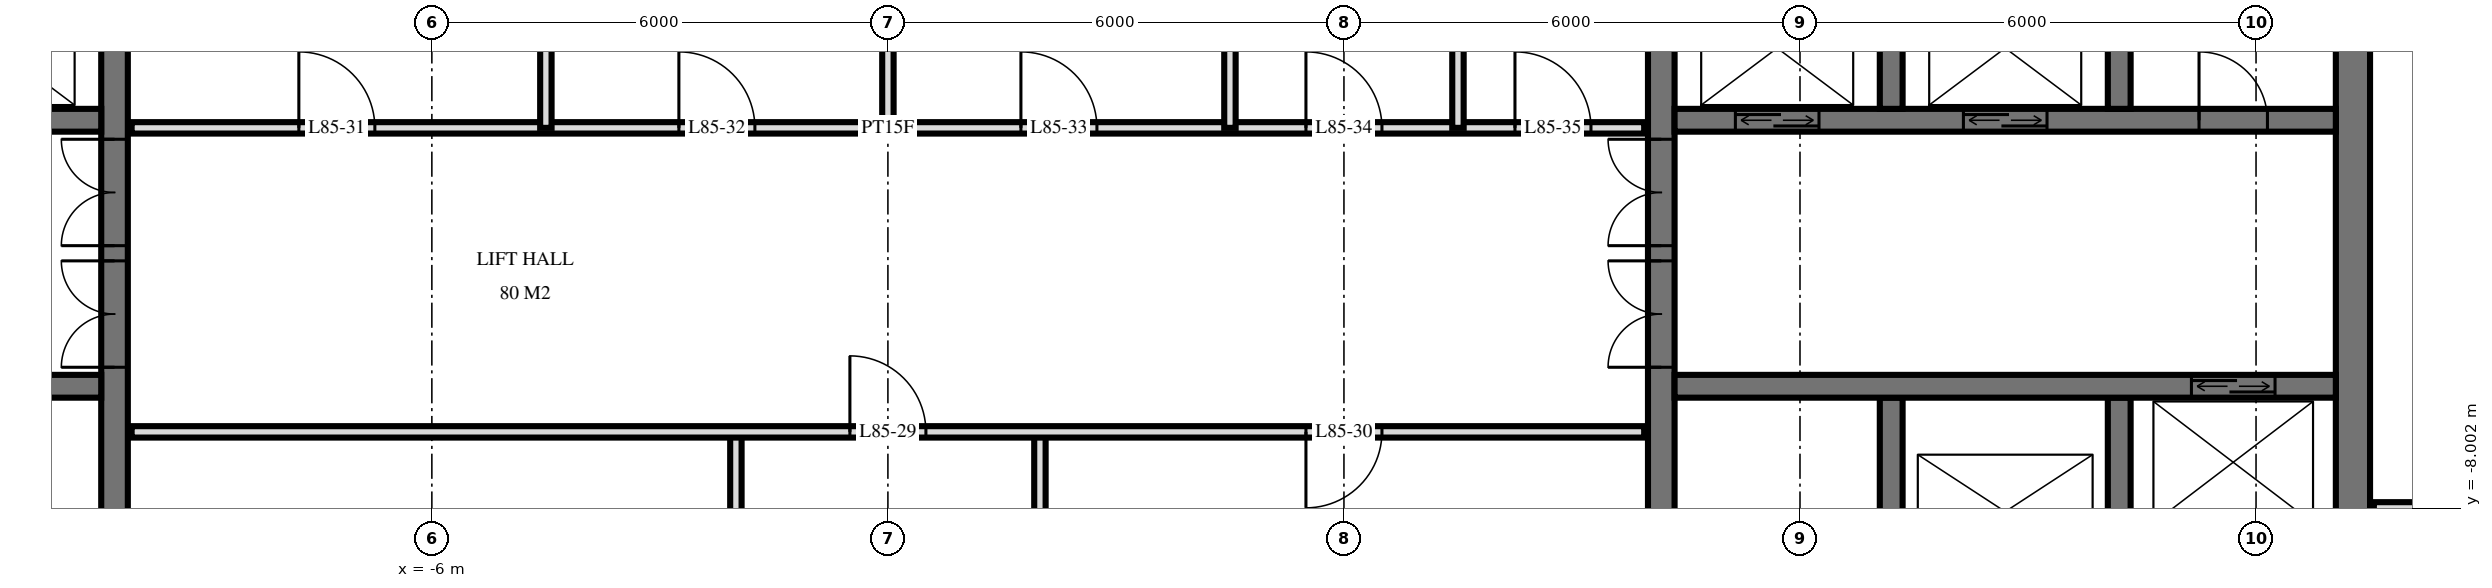
"""IFC4 building model, lengths in metres.
Left out: names, types, materials, properties, quantities, classifications, styles, units other than length and angle.
Written with IfcOpenShell. Run it as: python <this file> out.ifc"""

import sys

from ifc_helpers import new_model, si_unit, direction, frame, frame_2d, origin, place, context, subcontext, project, spatial, rectangle, extrude, element, fill, save


model = new_model("IFC4")
c1 = context("Model", 3, precision=1e-05, world=origin(), true_north=direction((0.0, 1.0)))
c2 = subcontext(c1, "Body", "Model", "MODEL_VIEW")
j1 = project(units=[si_unit("LENGTHUNIT", "METRE"), si_unit("PLANEANGLEUNIT", "RADIAN")], contexts=[c1])
p1 = place(None, origin())
s1 = spatial("IfcSite", under=j1, at=p1, CompositionType="ELEMENT")
p2 = place(p1, origin())
s2 = spatial("IfcBuilding", under=s1, at=p2, CompositionType="ELEMENT")
p3 = place(p2, frame((0.0, 0.0, 322.6)))
s3 = spatial("IfcBuildingStorey", under=s2, at=p3, CompositionType="ELEMENT", Elevation=322.6)
p4 = place(p3, frame((-10.175, -14.55, 0.0), z_axis=(0.0, 0.0, 1.0), x_axis=(0.0, 1.0, 0.0)))
e1 = element("IfcWall", 1, at=p4, inside=s3, PredefinedType="SHEAR", context=c2, shape_type="SweptSolid", body=[
    extrude(rectangle(XDim=14.1, YDim=0.35, at=frame_2d((7.05, 0.0))), origin(), (0.0, 0.0, 1.0), 4.0),
])
p5 = place(p4, frame((8.4, 0.0, 0.0)))
e2 = element("IfcOpeningElement", 2, at=p5, cuts=e1, PredefinedType="OPENING", context=c2, shape_type="SweptSolid", body=[
    extrude(rectangle(XDim=1.4, YDim=2.4, at=frame_2d((0.7, 1.2))), frame((0.0, 0.185, 0.0), z_axis=(0.0, -1.0, 0.0), x_axis=(1.0, 0.0, 0.0)), (0.0, 0.0, 1.0), 0.37),
])
p6 = place(p4, frame((10.0, 0.0, 0.0)))
e3 = element("IfcOpeningElement", 3, at=p6, cuts=e1, PredefinedType="OPENING", context=c2, shape_type="SweptSolid", body=[
    extrude(rectangle(XDim=1.4, YDim=2.4, at=frame_2d((0.7, 1.2))), frame((0.0, 0.185, 0.0), z_axis=(0.0, -1.0, 0.0), x_axis=(1.0, 0.0, 0.0)), (0.0, 0.0, 1.0), 0.37),
])
p7 = place(p4, frame((4.0, 0.0, 0.0)))
e4 = element("IfcOpeningElement", 4, at=p7, cuts=e1, PredefinedType="OPENING", context=c2, shape_type="SweptSolid", body=[
    extrude(rectangle(XDim=1.2, YDim=2.1, at=frame_2d((0.6, 1.05))), frame((0.0, 0.185, 0.0), z_axis=(0.0, -1.0, 0.0), x_axis=(1.0, 0.0, 0.0)), (0.0, 0.0, 1.0), 0.37),
])
p8 = place(p3, frame((-19.05, -2.9, 0.0), z_axis=(0.0, 0.0, 1.0), x_axis=(1.0, 0.0, 0.0)))
e5 = element("IfcWall", 5, at=p8, inside=s3, PredefinedType="SHEAR", context=c2, shape_type="SweptSolid", body=[
    extrude(rectangle(XDim=8.7, YDim=0.3, at=frame_2d((4.35, 0.0))), origin(), (0.0, 0.0, 1.0), 4.0),
])
p9 = place(p8, frame((6.8, 0.0, 0.0)))
e6 = element("IfcOpeningElement", 6, at=p9, cuts=e5, PredefinedType="OPENING", context=c2, shape_type="SweptSolid", body=[
    extrude(rectangle(XDim=1.1, YDim=2.1, at=frame_2d((0.55, 1.05))), frame((0.0, 0.16, 0.0), z_axis=(0.0, -1.0, 0.0), x_axis=(1.0, 0.0, 0.0)), (0.0, 0.0, 1.0), 0.32),
])
p10 = place(p8, frame((3.8, 0.0, 0.0)))
e7 = element("IfcOpeningElement", 7, at=p10, cuts=e5, PredefinedType="OPENING", context=c2, shape_type="SweptSolid", body=[
    extrude(rectangle(XDim=1.1, YDim=2.1, at=frame_2d((0.55, 1.05))), frame((0.0, 0.16, 0.0), z_axis=(0.0, -1.0, 0.0), x_axis=(1.0, 0.0, 0.0)), (0.0, 0.0, 1.0), 0.32),
])
p11 = place(p8, frame((0.9, 0.0, 0.0)))
e8 = element("IfcOpeningElement", 8, at=p11, cuts=e5, PredefinedType="OPENING", context=c2, shape_type="SweptSolid", body=[
    extrude(rectangle(XDim=0.9, YDim=2.1, at=frame_2d((0.45, 1.05))), frame((0.0, 0.16, 0.0), z_axis=(0.0, -1.0, 0.0), x_axis=(1.0, 0.0, 0.0)), (0.0, 0.0, 1.0), 0.32),
])
p12 = place(p3, frame((-19.05, -6.4, 0.0), z_axis=(0.0, 0.0, 1.0), x_axis=(1.0, 0.0, 0.0)))
e9 = element("IfcWall", 9, at=p12, inside=s3, PredefinedType="SHEAR", context=c2, shape_type="SweptSolid", body=[
    extrude(rectangle(XDim=8.7, YDim=0.3, at=frame_2d((4.35, 0.0))), origin(), (0.0, 0.0, 1.0), 4.0),
])
p13 = place(p12, frame((0.8, 0.0, 0.0)))
e10 = element("IfcOpeningElement", 10, at=p13, cuts=e9, PredefinedType="OPENING", context=c2, shape_type="SweptSolid", body=[
    extrude(rectangle(XDim=1.1, YDim=2.1, at=frame_2d((0.55, 1.05))), frame((0.0, 0.16, 0.0), z_axis=(0.0, -1.0, 0.0), x_axis=(1.0, 0.0, 0.0)), (0.0, 0.0, 1.0), 0.32),
])
p14 = place(p3, frame((10.175, -14.55, 0.0), z_axis=(0.0, 0.0, 1.0), x_axis=(0.0, 1.0, 0.0)))
e11 = element("IfcWall", 11, at=p14, inside=s3, PredefinedType="SHEAR", context=c2, shape_type="SweptSolid", body=[
    extrude(rectangle(XDim=14.1, YDim=0.35, at=frame_2d((7.05, 0.0))), origin(), (0.0, 0.0, 1.0), 4.0),
])
p15 = place(p14, frame((8.4, 0.0, 0.0)))
e12 = element("IfcOpeningElement", 12, at=p15, cuts=e11, PredefinedType="OPENING", context=c2, shape_type="SweptSolid", body=[
    extrude(rectangle(XDim=1.4, YDim=2.4, at=frame_2d((0.7, 1.2))), frame((0.0, 0.185, 0.0), z_axis=(0.0, -1.0, 0.0), x_axis=(1.0, 0.0, 0.0)), (0.0, 0.0, 1.0), 0.37),
])
p16 = place(p14, frame((10.0, 0.0, 0.0)))
e13 = element("IfcOpeningElement", 13, at=p16, cuts=e11, PredefinedType="OPENING", context=c2, shape_type="SweptSolid", body=[
    extrude(rectangle(XDim=1.4, YDim=2.4, at=frame_2d((0.7, 1.2))), frame((0.0, 0.185, 0.0), z_axis=(0.0, -1.0, 0.0), x_axis=(1.0, 0.0, 0.0)), (0.0, 0.0, 1.0), 0.37),
])
p17 = place(p14, frame((4.0, 0.0, 0.0)))
e14 = element("IfcOpeningElement", 14, at=p17, cuts=e11, PredefinedType="OPENING", context=c2, shape_type="SweptSolid", body=[
    extrude(rectangle(XDim=1.2, YDim=2.1, at=frame_2d((0.6, 1.05))), frame((0.0, 0.185, 0.0), z_axis=(0.0, -1.0, 0.0), x_axis=(1.0, 0.0, 0.0)), (0.0, 0.0, 1.0), 0.37),
])
p18 = place(p3, frame((19.275, -14.55, 0.0), z_axis=(0.0, 0.0, 1.0), x_axis=(0.0, 1.0, 0.0)))
e15 = element("IfcWall", 15, at=p18, inside=s3, PredefinedType="SHEAR", context=c2, shape_type="SweptSolid", body=[
    extrude(rectangle(XDim=14.1, YDim=0.45, at=frame_2d((7.05, 0.0))), origin(), (0.0, 0.0, 1.0), 4.0),
])
p19 = place(p3, frame((10.35, -2.9, 0.0), z_axis=(0.0, 0.0, 1.0), x_axis=(1.0, 0.0, 0.0)))
e16 = element("IfcWall", 16, at=p19, inside=s3, PredefinedType="SHEAR", context=c2, shape_type="SweptSolid", body=[
    extrude(rectangle(XDim=8.7, YDim=0.3, at=frame_2d((4.35, 0.0))), origin(), (0.0, 0.0, 1.0), 4.0),
])
p20 = place(p19, frame((0.8, 0.0, 0.0)))
e17 = element("IfcOpeningElement", 17, at=p20, cuts=e16, PredefinedType="OPENING", context=c2, shape_type="SweptSolid", body=[
    extrude(rectangle(XDim=1.1, YDim=2.1, at=frame_2d((0.55, 1.05))), frame((0.0, 0.16, 0.0), z_axis=(0.0, -1.0, 0.0), x_axis=(1.0, 0.0, 0.0)), (0.0, 0.0, 1.0), 0.32),
])
p21 = place(p19, frame((3.8, 0.0, 0.0)))
e18 = element("IfcOpeningElement", 18, at=p21, cuts=e16, PredefinedType="OPENING", context=c2, shape_type="SweptSolid", body=[
    extrude(rectangle(XDim=1.1, YDim=2.1, at=frame_2d((0.55, 1.05))), frame((0.0, 0.16, 0.0), z_axis=(0.0, -1.0, 0.0), x_axis=(1.0, 0.0, 0.0)), (0.0, 0.0, 1.0), 0.32),
])
p22 = place(p19, frame((6.9, 0.0, 0.0)))
e19 = element("IfcOpeningElement", 19, at=p22, cuts=e16, PredefinedType="OPENING", context=c2, shape_type="SweptSolid", body=[
    extrude(rectangle(XDim=0.9, YDim=2.1, at=frame_2d((0.45, 1.05))), frame((0.0, 0.16, 0.0), z_axis=(0.0, -1.0, 0.0), x_axis=(1.0, 0.0, 0.0)), (0.0, 0.0, 1.0), 0.32),
])
p23 = place(p3, frame((10.35, -6.4, 0.0), z_axis=(0.0, 0.0, 1.0), x_axis=(1.0, 0.0, 0.0)))
e20 = element("IfcWall", 20, at=p23, inside=s3, PredefinedType="SHEAR", context=c2, shape_type="SweptSolid", body=[
    extrude(rectangle(XDim=8.7, YDim=0.3, at=frame_2d((4.35, 0.0))), origin(), (0.0, 0.0, 1.0), 4.0),
])
p24 = place(p23, frame((6.8, 0.0, 0.0)))
e21 = element("IfcOpeningElement", 21, at=p24, cuts=e20, PredefinedType="OPENING", context=c2, shape_type="SweptSolid", body=[
    extrude(rectangle(XDim=1.1, YDim=2.1, at=frame_2d((0.55, 1.05))), frame((0.0, 0.16, 0.0), z_axis=(0.0, -1.0, 0.0), x_axis=(1.0, 0.0, 0.0)), (0.0, 0.0, 1.0), 0.32),
])
for number, where, z_axis, x_axis in (
    (22, (13.2, -2.75, 0.0), (0.0, 0.0, 1.0), (0.0, 1.0, 0.0)),
    (23, (13.2, -8.85, 0.0), (0.0, 0.0, 1.0), (0.0, 1.0, 0.0)),
    (24, (16.2, -2.75, 0.0), (0.0, 0.0, 1.0), (0.0, 1.0, 0.0)),
    (25, (16.2, -8.85, 0.0), (0.0, 0.0, 1.0), (0.0, 1.0, 0.0)),
):
    element("IfcWall", number, at=place(p3, frame(where, z_axis=z_axis, x_axis=x_axis)), inside=s3, PredefinedType="SHEAR", context=c2, shape_type="SweptSolid", body=[
        extrude(rectangle(XDim=2.3, YDim=0.3, at=frame_2d((1.15, 0.0))), origin(), (0.0, 0.0, 1.0), 4.0),
    ])
p25 = place(p3, frame((7.5, -3.0, 0.0), z_axis=(0.0, 0.0, 1.0), x_axis=(0.0, 1.0, 0.0)))
e26 = element("IfcWall", 26, at=p25, inside=s3, PredefinedType="PLUMBINGWALL", context=c2, shape_type="SweptSolid", body=[
    extrude(rectangle(XDim=7.445, YDim=0.15, at=frame_2d((3.723, 0.0))), origin(), (0.0, 0.0, 1.0), 3.72),
])
p26 = place(p3, frame((4.5, -3.0, 0.0), z_axis=(0.0, 0.0, 1.0), x_axis=(0.0, 1.0, 0.0)))
e27 = element("IfcWall", 27, at=p26, inside=s3, PredefinedType="PLUMBINGWALL", context=c2, shape_type="SweptSolid", body=[
    extrude(rectangle(XDim=7.077, YDim=0.15, at=frame_2d((3.539, 0.0))), origin(), (0.0, 0.0, 1.0), 3.72),
])
p27 = place(p3, frame((2.0, -11.0, 0.0), z_axis=(0.0, 0.0, 1.0), x_axis=(0.0, 1.0, 0.0)))
e28 = element("IfcWall", 28, at=p27, inside=s3, PredefinedType="PARTITIONING", context=c2, shape_type="SweptSolid", body=[
    extrude(rectangle(XDim=4.0, YDim=0.15, at=frame_2d((2.0, 0.0))), origin(), (0.0, 0.0, 1.0), 3.72),
])
p28 = place(p3, frame((0.0, -3.0, 0.0), z_axis=(0.0, 0.0, 1.0), x_axis=(0.0, 1.0, 0.0)))
e29 = element("IfcWall", 29, at=p28, inside=s3, PredefinedType="PARTITIONING", context=c2, shape_type="SweptSolid", body=[
    extrude(rectangle(XDim=6.524, YDim=0.15, at=frame_2d((3.262, 0.0))), origin(), (0.0, 0.0, 1.0), 3.72),
])
p29 = place(p3, frame((-2.0, -11.0, 0.0), z_axis=(0.0, 0.0, 1.0), x_axis=(0.0, 1.0, 0.0)))
e30 = element("IfcWall", 30, at=p29, inside=s3, PredefinedType="PARTITIONING", context=c2, shape_type="SweptSolid", body=[
    extrude(rectangle(XDim=4.0, YDim=0.15, at=frame_2d((2.0, 0.0))), origin(), (0.0, 0.0, 1.0), 3.72),
])
p30 = place(p3, frame((-4.5, -3.0, 0.0), z_axis=(0.0, 0.0, 1.0), x_axis=(0.0, 1.0, 0.0)))
e31 = element("IfcWall", 31, at=p30, inside=s3, PredefinedType="PARTITIONING", context=c2, shape_type="SweptSolid", body=[
    extrude(rectangle(XDim=5.972, YDim=0.15, at=frame_2d((2.986, 0.0))), origin(), (0.0, 0.0, 1.0), 3.72),
])
p31 = place(p3, frame((19.55, -8.0, 0.0), z_axis=(0.0, 0.0, 1.0), x_axis=(1.0, 0.0, 0.0)))
e32 = element("IfcWall", 32, at=p31, inside=s3, PredefinedType="PARTITIONING", context=c2, shape_type="SweptSolid", body=[
    extrude(rectangle(XDim=2.631, YDim=0.15, at=frame_2d((1.315, 0.0))), origin(), (0.0, 0.0, 1.0), 3.253),
])
p32 = place(p31, frame((0.931, 0.0, 0.0)))
e33 = element("IfcOpeningElement", 33, at=p32, cuts=e32, PredefinedType="OPENING", context=c2, shape_type="SweptSolid", body=[
    extrude(rectangle(XDim=0.9, YDim=2.1, at=frame_2d((0.45, 1.05))), frame((0.0, 0.085, 0.0), z_axis=(0.0, -1.0, 0.0), x_axis=(1.0, 0.0, 0.0)), (0.0, 0.0, 1.0), 0.17),
])
p33 = place(p3, frame((-9.95, -7.0, 0.0), z_axis=(0.0, 0.0, 1.0), x_axis=(1.0, 0.0, 0.0)))
e34 = element("IfcWall", 34, at=p33, inside=s3, PredefinedType="PARTITIONING", context=c2, shape_type="SweptSolid", body=[
    extrude(rectangle(XDim=19.9, YDim=0.15, at=frame_2d((9.95, 0.0))), origin(), (0.0, 0.0, 1.0), 3.72),
])
p34 = place(p33, frame((9.45, 0.0, 0.0)))
e35 = element("IfcOpeningElement", 35, at=p34, cuts=e34, PredefinedType="OPENING", context=c2, shape_type="SweptSolid", body=[
    extrude(rectangle(XDim=1.0, YDim=2.1, at=frame_2d((0.5, 1.05))), frame((0.0, 0.085, 0.0), z_axis=(0.0, -1.0, 0.0), x_axis=(1.0, 0.0, 0.0)), (0.0, 0.0, 1.0), 0.17),
])
p35 = place(p33, frame((15.45, 0.0, 0.0)))
e36 = element("IfcOpeningElement", 36, at=p35, cuts=e34, PredefinedType="OPENING", context=c2, shape_type="SweptSolid", body=[
    extrude(rectangle(XDim=1.0, YDim=2.1, at=frame_2d((0.5, 1.05))), frame((0.0, 0.085, 0.0), z_axis=(0.0, -1.0, 0.0), x_axis=(1.0, 0.0, 0.0)), (0.0, 0.0, 1.0), 0.17),
])
p36 = place(p3, frame((-9.95, -3.0, 0.0), z_axis=(0.0, 0.0, 1.0), x_axis=(1.0, 0.0, 0.0)))
e37 = element("IfcWall", 37, at=p36, inside=s3, PredefinedType="PARTITIONING", context=c2, shape_type="SweptSolid", body=[
    extrude(rectangle(XDim=19.9, YDim=0.15, at=frame_2d((9.95, 0.0))), origin(), (0.0, 0.0, 1.0), 3.72),
])
p37 = place(p36, frame((2.2, 0.0, 0.0)))
e38 = element("IfcOpeningElement", 38, at=p37, cuts=e37, PredefinedType="OPENING", context=c2, shape_type="SweptSolid", body=[
    extrude(rectangle(XDim=1.0, YDim=2.1, at=frame_2d((0.5, 1.05))), frame((0.0, 0.085, 0.0), z_axis=(0.0, -1.0, 0.0), x_axis=(1.0, 0.0, 0.0)), (0.0, 0.0, 1.0), 0.17),
])
p38 = place(p36, frame((7.2, 0.0, 0.0)))
e39 = element("IfcOpeningElement", 39, at=p38, cuts=e37, PredefinedType="OPENING", context=c2, shape_type="SweptSolid", body=[
    extrude(rectangle(XDim=1.0, YDim=2.1, at=frame_2d((0.5, 1.05))), frame((0.0, 0.085, 0.0), z_axis=(0.0, -1.0, 0.0), x_axis=(1.0, 0.0, 0.0)), (0.0, 0.0, 1.0), 0.17),
])
p39 = place(p36, frame((11.7, 0.0, 0.0)))
e40 = element("IfcOpeningElement", 40, at=p39, cuts=e37, PredefinedType="OPENING", context=c2, shape_type="SweptSolid", body=[
    extrude(rectangle(XDim=1.0, YDim=2.1, at=frame_2d((0.5, 1.05))), frame((0.0, 0.085, 0.0), z_axis=(0.0, -1.0, 0.0), x_axis=(1.0, 0.0, 0.0)), (0.0, 0.0, 1.0), 0.17),
])
p40 = place(p36, frame((15.45, 0.0, 0.0)))
e41 = element("IfcOpeningElement", 41, at=p40, cuts=e37, PredefinedType="OPENING", context=c2, shape_type="SweptSolid", body=[
    extrude(rectangle(XDim=1.0, YDim=2.1, at=frame_2d((0.5, 1.05))), frame((0.0, 0.085, 0.0), z_axis=(0.0, -1.0, 0.0), x_axis=(1.0, 0.0, 0.0)), (0.0, 0.0, 1.0), 0.17),
])
p41 = place(p36, frame((18.2, 0.0, 0.0)))
e42 = element("IfcOpeningElement", 42, at=p41, cuts=e37, PredefinedType="OPENING", context=c2, shape_type="SweptSolid", body=[
    extrude(rectangle(XDim=1.0, YDim=2.1, at=frame_2d((0.5, 1.05))), frame((0.0, 0.085, 0.0), z_axis=(0.0, -1.0, 0.0), x_axis=(1.0, 0.0, 0.0)), (0.0, 0.0, 1.0), 0.17),
])
p42 = place(p20, origin())
e43 = element("IfcDoor", 43, at=p42, inside=s3, OperationType="DOUBLE_DOOR_SLIDING", PredefinedType="USERDEFINED", context=c2, shape_type="SweptSolid", body=[
    extrude(rectangle(XDim=1.1, YDim=2.1, at=frame_2d((0.55, 1.05))), frame((0.0, 0.025, 0.0), z_axis=(0.0, -1.0, 0.0), x_axis=(1.0, 0.0, 0.0)), (0.0, 0.0, 1.0), 0.05),
])
fill(e17, e43)
p43 = place(p21, origin())
e44 = element("IfcDoor", 44, at=p43, inside=s3, OperationType="DOUBLE_DOOR_SLIDING", PredefinedType="USERDEFINED", context=c2, shape_type="SweptSolid", body=[
    extrude(rectangle(XDim=1.1, YDim=2.1, at=frame_2d((0.55, 1.05))), frame((0.0, 0.025, 0.0), z_axis=(0.0, -1.0, 0.0), x_axis=(1.0, 0.0, 0.0)), (0.0, 0.0, 1.0), 0.05),
])
fill(e18, e44)
p44 = place(p24, origin())
e45 = element("IfcDoor", 45, at=p44, inside=s3, OperationType="DOUBLE_DOOR_SLIDING", PredefinedType="USERDEFINED", context=c2, shape_type="SweptSolid", body=[
    extrude(rectangle(XDim=1.1, YDim=2.1, at=frame_2d((0.55, 1.05))), frame((0.0, 0.025, 0.0), z_axis=(0.0, -1.0, 0.0), x_axis=(1.0, 0.0, 0.0)), (0.0, 0.0, 1.0), 0.05),
])
fill(e21, e45)
p45 = place(p5, origin())
e46 = element("IfcDoor", 46, at=p45, inside=s3, OperationType="DOUBLE_DOOR_SINGLE_SWING", PredefinedType="DOOR", context=c2, shape_type="SweptSolid", body=[
    extrude(rectangle(XDim=1.4, YDim=2.4, at=frame_2d((0.7, 1.2))), frame((0.0, 0.025, 0.0), z_axis=(0.0, -1.0, 0.0), x_axis=(1.0, 0.0, 0.0)), (0.0, 0.0, 1.0), 0.05),
])
fill(e2, e46)
p46 = place(p6, origin())
e47 = element("IfcDoor", 47, at=p46, inside=s3, OperationType="DOUBLE_DOOR_SINGLE_SWING", PredefinedType="DOOR", context=c2, shape_type="SweptSolid", body=[
    extrude(rectangle(XDim=1.4, YDim=2.4, at=frame_2d((0.7, 1.2))), frame((0.0, 0.025, 0.0), z_axis=(0.0, -1.0, 0.0), x_axis=(1.0, 0.0, 0.0)), (0.0, 0.0, 1.0), 0.05),
])
fill(e3, e47)
p47 = place(p15, origin())
e48 = element("IfcDoor", 48, at=p47, inside=s3, OperationType="DOUBLE_DOOR_SINGLE_SWING", PredefinedType="DOOR", context=c2, shape_type="SweptSolid", body=[
    extrude(rectangle(XDim=1.4, YDim=2.4, at=frame_2d((0.7, 1.2))), frame((0.0, 0.025, 0.0), z_axis=(0.0, -1.0, 0.0), x_axis=(1.0, 0.0, 0.0)), (0.0, 0.0, 1.0), 0.05),
])
fill(e12, e48)
p48 = place(p16, origin())
e49 = element("IfcDoor", 49, at=p48, inside=s3, OperationType="DOUBLE_DOOR_SINGLE_SWING", PredefinedType="DOOR", context=c2, shape_type="SweptSolid", body=[
    extrude(rectangle(XDim=1.4, YDim=2.4, at=frame_2d((0.7, 1.2))), frame((0.0, 0.025, 0.0), z_axis=(0.0, -1.0, 0.0), x_axis=(1.0, 0.0, 0.0)), (0.0, 0.0, 1.0), 0.05),
])
fill(e13, e49)
p49 = place(p22, origin())
e50 = element("IfcDoor", 50, at=p49, inside=s3, OperationType="SINGLE_SWING_RIGHT", PredefinedType="DOOR", context=c2, shape_type="SweptSolid", body=[
    extrude(rectangle(XDim=0.9, YDim=2.1, at=frame_2d((0.45, 1.05))), frame((0.0, 0.025, 0.0), z_axis=(0.0, -1.0, 0.0), x_axis=(1.0, 0.0, 0.0)), (0.0, 0.0, 1.0), 0.05),
])
fill(e19, e50)
p50 = place(p34, origin())
e51 = element("IfcDoor", 51, at=p50, inside=s3, OperationType="SINGLE_SWING_RIGHT", PredefinedType="DOOR", context=c2, shape_type="SweptSolid", body=[
    extrude(rectangle(XDim=1.0, YDim=2.1, at=frame_2d((0.5, 1.05))), frame((0.0, 0.025, 0.0), z_axis=(0.0, -1.0, 0.0), x_axis=(1.0, 0.0, 0.0)), (0.0, 0.0, 1.0), 0.05),
])
fill(e35, e51)
p51 = place(p35, frame((0.5, 0.0, 0.0), z_axis=(0.0, 0.0, 1.0), x_axis=(-1.0, 0.0, 0.0)))
e52 = element("IfcDoor", 52, at=p51, inside=s3, OperationType="SINGLE_SWING_LEFT", PredefinedType="DOOR", context=c2, shape_type="SweptSolid", body=[
    extrude(rectangle(XDim=1.0, YDim=2.1, at=frame_2d((0.0, 1.05))), frame((0.0, -0.025, 0.0), z_axis=(0.0, 1.0, 0.0), x_axis=(-1.0, 0.0, 0.0)), (0.0, 0.0, 1.0), 0.05),
])
fill(e36, e52)
p52 = place(p37, origin())
e53 = element("IfcDoor", 53, at=p52, inside=s3, OperationType="SINGLE_SWING_RIGHT", PredefinedType="DOOR", context=c2, shape_type="SweptSolid", body=[
    extrude(rectangle(XDim=1.0, YDim=2.1, at=frame_2d((0.5, 1.05))), frame((0.0, 0.025, 0.0), z_axis=(0.0, -1.0, 0.0), x_axis=(1.0, 0.0, 0.0)), (0.0, 0.0, 1.0), 0.05),
])
fill(e38, e53)
p53 = place(p38, origin())
e54 = element("IfcDoor", 54, at=p53, inside=s3, OperationType="SINGLE_SWING_RIGHT", PredefinedType="DOOR", context=c2, shape_type="SweptSolid", body=[
    extrude(rectangle(XDim=1.0, YDim=2.1, at=frame_2d((0.5, 1.05))), frame((0.0, 0.025, 0.0), z_axis=(0.0, -1.0, 0.0), x_axis=(1.0, 0.0, 0.0)), (0.0, 0.0, 1.0), 0.05),
])
fill(e39, e54)
p54 = place(p39, origin())
e55 = element("IfcDoor", 55, at=p54, inside=s3, OperationType="SINGLE_SWING_RIGHT", PredefinedType="DOOR", context=c2, shape_type="SweptSolid", body=[
    extrude(rectangle(XDim=1.0, YDim=2.1, at=frame_2d((0.5, 1.05))), frame((0.0, 0.025, 0.0), z_axis=(0.0, -1.0, 0.0), x_axis=(1.0, 0.0, 0.0)), (0.0, 0.0, 1.0), 0.05),
])
fill(e40, e55)
p55 = place(p40, origin())
e56 = element("IfcDoor", 56, at=p55, inside=s3, OperationType="SINGLE_SWING_RIGHT", PredefinedType="DOOR", context=c2, shape_type="SweptSolid", body=[
    extrude(rectangle(XDim=1.0, YDim=2.1, at=frame_2d((0.5, 1.05))), frame((0.0, 0.025, 0.0), z_axis=(0.0, -1.0, 0.0), x_axis=(1.0, 0.0, 0.0)), (0.0, 0.0, 1.0), 0.05),
])
fill(e41, e56)
p56 = place(p41, origin())
e57 = element("IfcDoor", 57, at=p56, inside=s3, OperationType="SINGLE_SWING_RIGHT", PredefinedType="DOOR", context=c2, shape_type="SweptSolid", body=[
    extrude(rectangle(XDim=1.0, YDim=2.1, at=frame_2d((0.5, 1.05))), frame((0.0, 0.025, 0.0), z_axis=(0.0, -1.0, 0.0), x_axis=(1.0, 0.0, 0.0)), (0.0, 0.0, 1.0), 0.05),
])
fill(e42, e57)
save(model, sys.argv[1])
